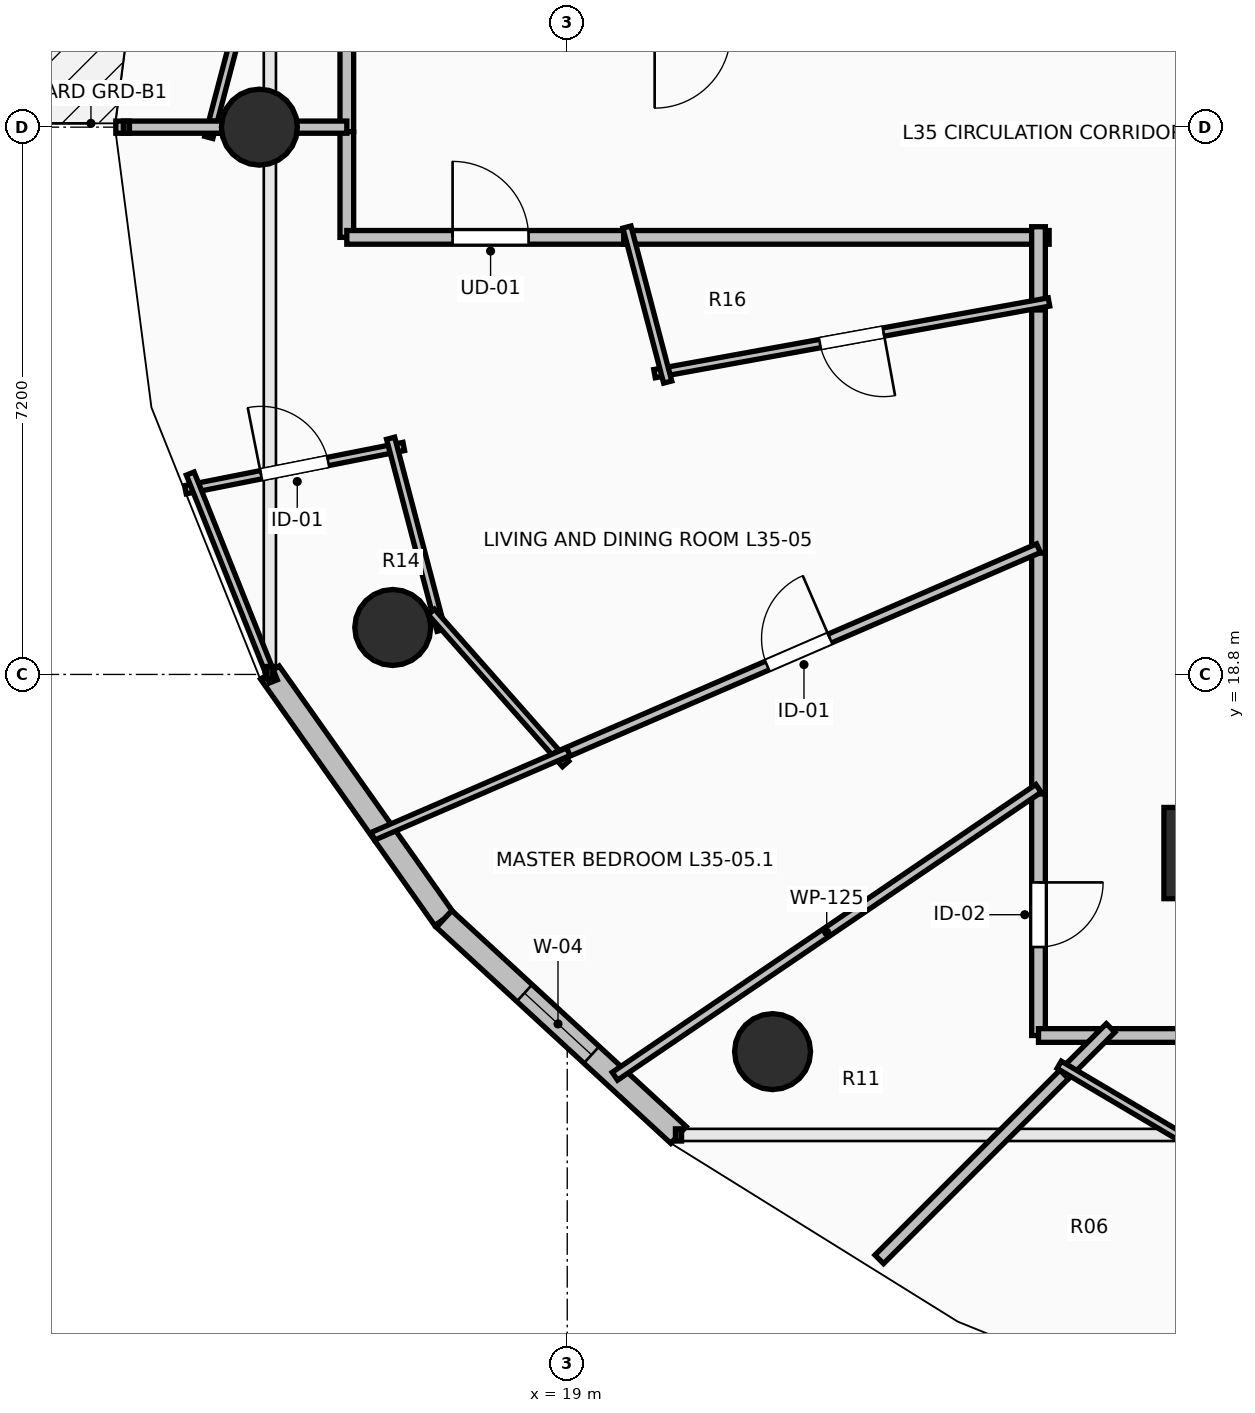
"""IFC4 building model, lengths in metres.
Left out: names, types, materials, properties, quantities, classifications, styles, units other than length and angle.
Written with IfcOpenShell. Run it as: python <this file> out.ifc"""

import sys

from ifc_helpers import new_model, si_unit, direction, frame, frame_2d, origin, origin_2d, place, context, subcontext, project, spatial, rectangle, circle, extrude, element, fill, save


model = new_model("IFC4")
c1 = context("Model", 3, precision=1e-05, world=origin(), true_north=direction((0.0, 1.0)))
c2 = subcontext(c1, "Body", "Model", "MODEL_VIEW")
j1 = project(units=[si_unit("LENGTHUNIT", "METRE"), si_unit("PLANEANGLEUNIT", "RADIAN")], contexts=[c1])
p1 = place(None, origin())
s1 = spatial("IfcSite", under=j1, at=p1, CompositionType="ELEMENT")
p2 = place(p1, origin())
s2 = spatial("IfcBuilding", under=s1, at=p2, CompositionType="ELEMENT")
p3 = place(p2, frame((0.0, 0.0, 132.6)))
s3 = spatial("IfcBuildingStorey", under=s2, at=p3, CompositionType="ELEMENT", Elevation=132.6)
for number, where, z_axis, x_axis in (
    (1, (14.95, 26.0, 0.0), (0.0, 0.0, 1.0), (-1.0, 0.0, 0.0)),
    (2, (16.705, 19.418, 0.0), (0.0, 0.0, 1.0), (-0.924, -0.383, 0.0)),
    (3, (21.701, 13.838, 0.0), (0.0, 0.0, 1.0), (-0.707, -0.707, 0.0)),
):
    element("IfcColumn", number, at=place(p3, frame(where, z_axis=z_axis, x_axis=x_axis)), inside=s3, PredefinedType="COLUMN", context=c2, shape_type="SweptSolid", body=[
        extrude(circle(Radius=0.5, at=origin_2d()), origin(), (0.0, 0.0, 1.0), 3.5),
    ])
p4 = place(p3, frame((27.25, 16.45, 0.0), z_axis=(0.0, 0.0, 1.0), x_axis=(1.0, 0.0, 0.0)))
e4 = element("IfcColumn", 4, at=p4, inside=s3, PredefinedType="PILASTER", context=c2, shape_type="SweptSolid", body=[
    extrude(rectangle(XDim=0.8, YDim=1.2, at=origin_2d()), origin(), (0.0, 0.0, 1.0), 3.5),
])
p5 = place(p3, frame((15.088, 18.825, 0.0), z_axis=(0.0, 0.0, 1.0), x_axis=(0.577269753207, -0.816553508371, 0.0)))
e5 = element("IfcWall", 5, at=p5, inside=s3, PredefinedType="STANDARD", context=c2, shape_type="SweptSolid", body=[
    extrude(rectangle(XDim=3.97, YDim=0.3, at=frame_2d((1.985, 0.0))), origin(), (0.0, 0.0, 1.0), 3.24),
])
p6 = place(p3, frame((17.38, 15.583, 0.0), z_axis=(0.0, 0.0, 1.0), x_axis=(0.735477154165, -0.677549522693, 0.0)))
e6 = element("IfcWall", 6, at=p6, inside=s3, PredefinedType="STANDARD", context=c2, shape_type="SweptSolid", body=[
    extrude(rectangle(XDim=4.194, YDim=0.3, at=frame_2d((2.097, 0.0))), origin(), (0.0, 0.0, 1.0), 3.24),
])
p7 = place(p6, frame((1.438, 0.0, 0.85)))
e7 = element("IfcOpeningElement", 7, at=p7, cuts=e6, PredefinedType="OPENING", context=c2, shape_type="SweptSolid", body=[
    extrude(rectangle(XDim=1.2, YDim=1.95, at=frame_2d((0.6, 0.975))), frame((0.0, 0.165, 0.0), z_axis=(0.0, -1.0, 0.0), x_axis=(1.0, 0.0, 0.0)), (0.0, 0.0, 1.0), 0.33),
])
p8 = place(p3, frame((16.1, 27.25, 0.0), z_axis=(0.0, 0.0, 1.0), x_axis=(0.0, -1.0, 0.0)))
e8 = element("IfcWall", 8, at=p8, inside=s3, PredefinedType="PARTITIONING", context=c2, shape_type="SweptSolid", body=[
    extrude(rectangle(XDim=1.31, YDim=0.18, at=frame_2d((0.655, 0.0))), origin(), (0.0, 0.0, 1.0), 2.432),
])
p9 = place(p3, frame((16.1, 25.94, 0.0), z_axis=(0.0, 0.0, 1.0), x_axis=(0.0, -1.0, 0.0)))
e9 = element("IfcWall", 9, at=p9, inside=s3, PredefinedType="PARTITIONING", context=c2, shape_type="SweptSolid", body=[
    extrude(rectangle(XDim=1.39, YDim=0.18, at=frame_2d((0.695, 0.0))), origin(), (0.0, 0.0, 1.0), 2.432),
])
p10 = place(p3, frame((16.1, 24.55, 0.0), z_axis=(0.0, 0.0, 1.0), x_axis=(1.0, 0.0, 0.0)))
e10 = element("IfcWall", 10, at=p10, inside=s3, PredefinedType="PARTITIONING", context=c2, shape_type="SweptSolid", body=[
    extrude(rectangle(XDim=3.783, YDim=0.18, at=frame_2d((1.892, 0.0))), origin(), (0.0, 0.0, 1.0), 2.874),
])
p11 = place(p10, frame((1.392, 0.0, 0.0)))
e11 = element("IfcOpeningElement", 11, at=p11, cuts=e10, PredefinedType="OPENING", context=c2, shape_type="SweptSolid", body=[
    extrude(rectangle(XDim=1.0, YDim=2.15, at=frame_2d((0.5, 1.075))), frame((0.0, 0.105, 0.0), z_axis=(0.0, -1.0, 0.0), x_axis=(1.0, 0.0, 0.0)), (0.0, 0.0, 1.0), 0.21),
])
p12 = place(p3, frame((25.2, 23.735, 0.0), z_axis=(0.0, 0.0, 1.0), x_axis=(0.0, -1.0, 0.0)))
e12 = element("IfcWall", 12, at=p12, inside=s3, PredefinedType="PARTITIONING", context=c2, shape_type="SweptSolid", body=[
    extrude(rectangle(XDim=3.339, YDim=0.18, at=frame_2d((1.669, 0.0))), origin(), (0.0, 0.0, 1.0), 3.24),
])
p13 = place(p3, frame((19.743, 24.55, 0.0), z_axis=(0.0, 0.0, 1.0), x_axis=(1.0, 0.0, 0.0)))
e13 = element("IfcWall", 13, at=p13, inside=s3, PredefinedType="PARTITIONING", context=c2, shape_type="SweptSolid", body=[
    extrude(rectangle(XDim=5.597, YDim=0.18, at=frame_2d((2.799, 0.0))), origin(), (0.0, 0.0, 1.0), 2.922),
])
p14 = place(p3, frame((25.2, 24.69, 0.0), z_axis=(0.0, 0.0, 1.0), x_axis=(0.0, -1.0, 0.0)))
e14 = element("IfcWall", 14, at=p14, inside=s3, PredefinedType="PARTITIONING", context=c2, shape_type="SweptSolid", body=[
    extrude(rectangle(XDim=1.095, YDim=0.18, at=frame_2d((0.547, 0.0))), origin(), (0.0, 0.0, 1.0), 3.24),
])
p15 = place(p3, frame((25.2, 20.396, 0.0), z_axis=(0.0, 0.0, 1.0), x_axis=(0.0, -1.0, 0.0)))
e15 = element("IfcWall", 15, at=p15, inside=s3, PredefinedType="PARTITIONING", context=c2, shape_type="SweptSolid", body=[
    extrude(rectangle(XDim=3.168, YDim=0.18, at=frame_2d((1.584, 0.0))), origin(), (0.0, 0.0, 1.0), 2.432),
])
p16 = place(p3, frame((25.2, 17.228, 0.0), z_axis=(0.0, 0.0, 1.0), x_axis=(0.0, -1.0, 0.0)))
e16 = element("IfcWall", 16, at=p16, inside=s3, PredefinedType="PARTITIONING", context=c2, shape_type="SweptSolid", body=[
    extrude(rectangle(XDim=3.178, YDim=0.18, at=frame_2d((1.589, 0.0))), origin(), (0.0, 0.0, 1.0), 2.432),
])
p17 = place(p16, frame((1.164, 0.0, 0.0)))
e17 = element("IfcOpeningElement", 17, at=p17, cuts=e16, PredefinedType="OPENING", context=c2, shape_type="SweptSolid", body=[
    extrude(rectangle(XDim=0.85, YDim=2.1, at=frame_2d((0.425, 1.05))), frame((0.0, 0.105, 0.0), z_axis=(0.0, -1.0, 0.0), x_axis=(1.0, 0.0, 0.0)), (0.0, 0.0, 1.0), 0.21),
])
p18 = place(p3, frame((25.2, 14.05, 0.0), z_axis=(0.0, 0.0, 1.0), x_axis=(1.0, 0.0, 0.0)))
e18 = element("IfcWall", 18, at=p18, inside=s3, PredefinedType="PARTITIONING", context=c2, shape_type="SweptSolid", body=[
    extrude(rectangle(XDim=0.91, YDim=0.18, at=frame_2d((0.455, 0.0))), origin(), (0.0, 0.0, 1.0), 2.874),
])
p19 = place(p3, frame((25.97, 14.05, 0.0), z_axis=(0.0, 0.0, 1.0), x_axis=(1.0, 0.0, 0.0)))
e19 = element("IfcWall", 19, at=p19, inside=s3, PredefinedType="PARTITIONING", context=c2, shape_type="SweptSolid", body=[
    extrude(rectangle(XDim=3.821, YDim=0.18, at=frame_2d((1.911, 0.0))), origin(), (0.0, 0.0, 1.0), 2.432),
])
p20 = place(p3, frame((16.159, 32.988, 0.0), z_axis=(0.0, 0.0, 1.0), x_axis=(-0.254441093922, -0.967088274008, 0.0)))
e20 = element("IfcWall", 20, at=p20, inside=s3, PredefinedType="PARTITIONING", context=c2, shape_type="SweptSolid", body=[
    extrude(rectangle(XDim=7.366, YDim=0.11, at=frame_2d((3.683, 0.0))), origin(), (0.0, 0.0, 1.0), 3.24),
])
p21 = place(p20, frame((3.233, 0.0, 0.0)))
e21 = element("IfcOpeningElement", 21, at=p21, cuts=e20, PredefinedType="OPENING", context=c2, shape_type="SweptSolid", body=[
    extrude(rectangle(XDim=0.9, YDim=2.1, at=frame_2d((0.45, 1.05))), frame((0.0, 0.07, 0.0), z_axis=(0.0, -1.0, 0.0), x_axis=(1.0, 0.0, 0.0)), (0.0, 0.0, 1.0), 0.14),
])
p22 = place(p3, frame((14.32, 26.0, 0.0), z_axis=(0.0, 0.0, 1.0), x_axis=(1.0, 0.0, 0.0)))
e22 = element("IfcWall", 22, at=p22, inside=s3, PredefinedType="PARTITIONING", context=c2, shape_type="SweptSolid", body=[
    extrude(rectangle(XDim=1.78, YDim=0.16, at=frame_2d((0.89, 0.0))), origin(), (0.0, 0.0, 1.0), 2.432),
])
p23 = place(p3, frame((13.061, 26.0, 0.0), z_axis=(0.0, 0.0, 1.0), x_axis=(1.0, 0.0, 0.0)))
e23 = element("IfcWall", 23, at=p23, inside=s3, PredefinedType="PARTITIONING", context=c2, shape_type="SweptSolid", body=[
    extrude(rectangle(XDim=1.399, YDim=0.16, at=frame_2d((0.699, 0.0))), origin(), (0.0, 0.0, 1.0), 3.24),
])
p24 = place(p3, frame((25.338, 23.7, 0.0), z_axis=(0.0, 0.0, 1.0), x_axis=(-0.983892120625, -0.178763237197, 0.0)))
e24 = element("IfcWall", 24, at=p24, inside=s3, PredefinedType="PARTITIONING", context=c2, shape_type="SweptSolid", body=[
    extrude(rectangle(XDim=5.274, YDim=0.11, at=frame_2d((2.637, 0.0))), origin(), (0.0, 0.0, 1.0), 2.922),
])
p25 = place(p24, frame((2.212, 0.0, 0.0)))
e25 = element("IfcOpeningElement", 25, at=p25, cuts=e24, PredefinedType="OPENING", context=c2, shape_type="SweptSolid", body=[
    extrude(rectangle(XDim=0.85, YDim=2.1, at=frame_2d((0.425, 1.05))), frame((0.0, 0.07, 0.0), z_axis=(0.0, -1.0, 0.0), x_axis=(1.0, 0.0, 0.0)), (0.0, 0.0, 1.0), 0.14),
])
p26 = place(p3, frame((20.322, 22.646, 0.0), z_axis=(0.0, 0.0, 1.0), x_axis=(-0.254316581286, 0.967121024734, 0.0)))
e26 = element("IfcWall", 26, at=p26, inside=s3, PredefinedType="PARTITIONING", context=c2, shape_type="SweptSolid", body=[
    extrude(rectangle(XDim=2.108, YDim=0.11, at=frame_2d((1.054, 0.0))), origin(), (0.0, 0.0, 1.0), 3.24),
])
p27 = place(p3, frame((13.977, 21.23, 0.0), z_axis=(0.0, 0.0, 1.0), x_axis=(0.980903189798, 0.194496612425, 0.0)))
e27 = element("IfcWall", 27, at=p27, inside=s3, PredefinedType="PARTITIONING", context=c2, shape_type="SweptSolid", body=[
    extrude(rectangle(XDim=2.928, YDim=0.11, at=frame_2d((1.464, 0.0))), origin(), (0.0, 0.0, 1.0), 2.728),
])
p28 = place(p27, frame((1.014, 0.0, 0.0)))
e28 = element("IfcOpeningElement", 28, at=p28, cuts=e27, PredefinedType="OPENING", context=c2, shape_type="SweptSolid", body=[
    extrude(rectangle(XDim=0.9, YDim=2.1, at=frame_2d((0.45, 1.05))), frame((0.0, 0.07, 0.0), z_axis=(0.0, -1.0, 0.0), x_axis=(1.0, 0.0, 0.0)), (0.0, 0.0, 1.0), 0.14),
])
p29 = place(p3, frame((16.677, 21.907, 0.0), z_axis=(0.0, 0.0, 1.0), x_axis=(0.254263226868, -0.967135053373, 0.0)))
e29 = element("IfcWall", 29, at=p29, inside=s3, PredefinedType="PARTITIONING", context=c2, shape_type="SweptSolid", body=[
    extrude(rectangle(XDim=2.612, YDim=0.11, at=frame_2d((1.306, 0.0))), origin(), (0.0, 0.0, 1.0), 2.432),
])
p30 = place(p3, frame((17.212, 19.622, 0.0), z_axis=(0.0, 0.0, 1.0), x_axis=(0.662196601313, -0.749330141666, 0.0)))
e30 = element("IfcWall", 30, at=p30, inside=s3, PredefinedType="PARTITIONING", context=c2, shape_type="SweptSolid", body=[
    extrude(rectangle(XDim=2.667, YDim=0.11, at=frame_2d((1.334, 0.0))), origin(), (0.0, 0.0, 1.0), 2.432),
])
p31 = place(p3, frame((14.04, 21.443, 0.0), z_axis=(0.0, 0.0, 1.0), x_axis=(0.371490730185, -0.928436663099, 0.0)))
e31 = element("IfcWall", 31, at=p31, inside=s3, PredefinedType="PARTITIONING", context=c2, shape_type="SweptSolid", body=[
    extrude(rectangle(XDim=2.945, YDim=0.11, at=frame_2d((1.472, 0.0))), origin(), (0.0, 0.0, 1.0), 3.24),
])
p32 = place(p3, frame((18.886, 17.728, 0.0), z_axis=(0.0, 0.0, 1.0), x_axis=(0.917722116807, 0.397223005782, 0.0)))
e32 = element("IfcWall", 32, at=p32, inside=s3, PredefinedType="PARTITIONING", context=c2, shape_type="SweptSolid", body=[
    extrude(rectangle(XDim=6.88, YDim=0.125, at=frame_2d((3.44, 0.0))), origin(), (0.0, 0.0, 1.0), 2.432),
])
p33 = place(p32, frame((2.99, 0.0, 0.0)))
e33 = element("IfcOpeningElement", 33, at=p33, cuts=e32, PredefinedType="OPENING", context=c2, shape_type="SweptSolid", body=[
    extrude(rectangle(XDim=0.9, YDim=2.1, at=frame_2d((0.45, 1.05))), frame((0.0, 0.077, 0.0), z_axis=(0.0, -1.0, 0.0), x_axis=(1.0, 0.0, 0.0)), (0.0, 0.0, 1.0), 0.155),
])
p34 = place(p3, frame((16.444, 16.671, 0.0), z_axis=(0.0, 0.0, 1.0), x_axis=(0.91777806569, 0.39709371959, 0.0)))
e34 = element("IfcWall", 34, at=p34, inside=s3, PredefinedType="PARTITIONING", context=c2, shape_type="SweptSolid", body=[
    extrude(rectangle(XDim=2.801, YDim=0.11, at=frame_2d((1.4, 0.0))), origin(), (0.0, 0.0, 1.0), 2.728),
])
p35 = place(p3, frame((19.627, 13.514, 0.0), z_axis=(0.0, 0.0, 1.0), x_axis=(0.827101009155, 0.562053307663, 0.0)))
e35 = element("IfcWall", 35, at=p35, inside=s3, PredefinedType="PARTITIONING", context=c2, shape_type="SweptSolid", body=[
    extrude(rectangle(XDim=6.738, YDim=0.125, at=frame_2d((3.369, 0.0))), origin(), (0.0, 0.0, 1.0), 2.432),
])
p36 = place(p3, frame((23.105, 11.105, 0.0), z_axis=(0.0, 0.0, 1.0), x_axis=(0.707106781187, 0.707106781187, 0.0)))
e36 = element("IfcWall", 36, at=p36, inside=s3, PredefinedType="PARTITIONING", context=c2, shape_type="SweptSolid", body=[
    extrude(rectangle(XDim=3.581, YDim=0.16, at=frame_2d((1.791, 0.0))), origin(), (0.0, 0.0, 1.0), 2.728),
])
p37 = place(p3, frame((25.538, 13.538, 0.0), z_axis=(0.0, 0.0, 1.0), x_axis=(0.707106781187, 0.707106781187, 0.0)))
e37 = element("IfcWall", 37, at=p37, inside=s3, PredefinedType="PARTITIONING", context=c2, shape_type="SweptSolid", body=[
    extrude(rectangle(XDim=0.864, YDim=0.16, at=frame_2d((0.432, 0.0))), origin(), (0.0, 0.0, 1.0), 2.874),
])
p38 = place(p3, frame((27.611, 12.399, 0.0), z_axis=(0.0, 0.0, 1.0), x_axis=(-0.860546797705, 0.509371386082, 0.0)))
e38 = element("IfcWall", 38, at=p38, inside=s3, PredefinedType="PARTITIONING", context=c2, shape_type="SweptSolid", body=[
    extrude(rectangle(XDim=2.485, YDim=0.11, at=frame_2d((1.242, 0.0))), origin(), (0.0, 0.0, 1.0), 2.874),
])
p39 = place(p3, frame((26.785, 9.228, 0.0), z_axis=(0.0, 0.0, 1.0), x_axis=(0.555802936367, 0.831314077786, 0.0)))
e39 = element("IfcWall", 39, at=p39, inside=s3, PredefinedType="PARTITIONING", context=c2, shape_type="SweptSolid", body=[
    extrude(rectangle(XDim=2.349, YDim=0.11, at=frame_2d((1.175, 0.0))), origin(), (0.0, 0.0, 1.0), 2.728),
])
p40 = place(p7, origin())
e40 = element("IfcWindow", 40, at=p40, inside=s3, PartitioningType="SINGLE_PANEL", PredefinedType="WINDOW", context=c2, shape_type="SweptSolid", body=[
    extrude(rectangle(XDim=1.2, YDim=1.95, at=frame_2d((0.6, 0.975))), frame((0.0, 0.03, 0.0), z_axis=(0.0, -1.0, 0.0), x_axis=(1.0, 0.0, 0.0)), (0.0, 0.0, 1.0), 0.06),
])
fill(e7, e40)
p41 = place(p11, origin())
e41 = element("IfcDoor", 41, at=p41, inside=s3, OperationType="SINGLE_SWING_LEFT", PredefinedType="DOOR", context=c2, shape_type="SweptSolid", body=[
    extrude(rectangle(XDim=1.0, YDim=2.15, at=frame_2d((0.5, 1.075))), frame((0.0, 0.025, 0.0), z_axis=(0.0, -1.0, 0.0), x_axis=(1.0, 0.0, 0.0)), (0.0, 0.0, 1.0), 0.05),
])
fill(e11, e41)
p42 = place(p25, origin())
e42 = element("IfcDoor", 42, at=p42, inside=s3, OperationType="SINGLE_SWING_LEFT", PredefinedType="DOOR", context=c2, shape_type="SweptSolid", body=[
    extrude(rectangle(XDim=0.85, YDim=2.1, at=frame_2d((0.425, 1.05))), frame((0.0, 0.025, 0.0), z_axis=(0.0, -1.0, 0.0), x_axis=(1.0, 0.0, 0.0)), (0.0, 0.0, 1.0), 0.05),
])
fill(e25, e42)
p43 = place(p28, origin())
e43 = element("IfcDoor", 43, at=p43, inside=s3, OperationType="SINGLE_SWING_LEFT", PredefinedType="DOOR", context=c2, shape_type="SweptSolid", body=[
    extrude(rectangle(XDim=0.9, YDim=2.1, at=frame_2d((0.45, 1.05))), frame((0.0, 0.025, 0.0), z_axis=(0.0, -1.0, 0.0), x_axis=(1.0, 0.0, 0.0)), (0.0, 0.0, 1.0), 0.05),
])
fill(e28, e43)
p44 = place(p33, origin())
e44 = element("IfcDoor", 44, at=p44, inside=s3, OperationType="SINGLE_SWING_RIGHT", PredefinedType="DOOR", context=c2, shape_type="SweptSolid", body=[
    extrude(rectangle(XDim=0.9, YDim=2.1, at=frame_2d((0.45, 1.05))), frame((0.0, 0.025, 0.0), z_axis=(0.0, -1.0, 0.0), x_axis=(1.0, 0.0, 0.0)), (0.0, 0.0, 1.0), 0.05),
])
fill(e33, e44)
p45 = place(p17, origin())
e45 = element("IfcDoor", 45, at=p45, inside=s3, OperationType="SINGLE_SWING_LEFT", PredefinedType="DOOR", context=c2, shape_type="SweptSolid", body=[
    extrude(rectangle(XDim=0.85, YDim=2.1, at=frame_2d((0.425, 1.05))), frame((0.0, 0.025, 0.0), z_axis=(0.0, -1.0, 0.0), x_axis=(1.0, 0.0, 0.0)), (0.0, 0.0, 1.0), 0.05),
])
fill(e17, e45)
save(model, sys.argv[1])
